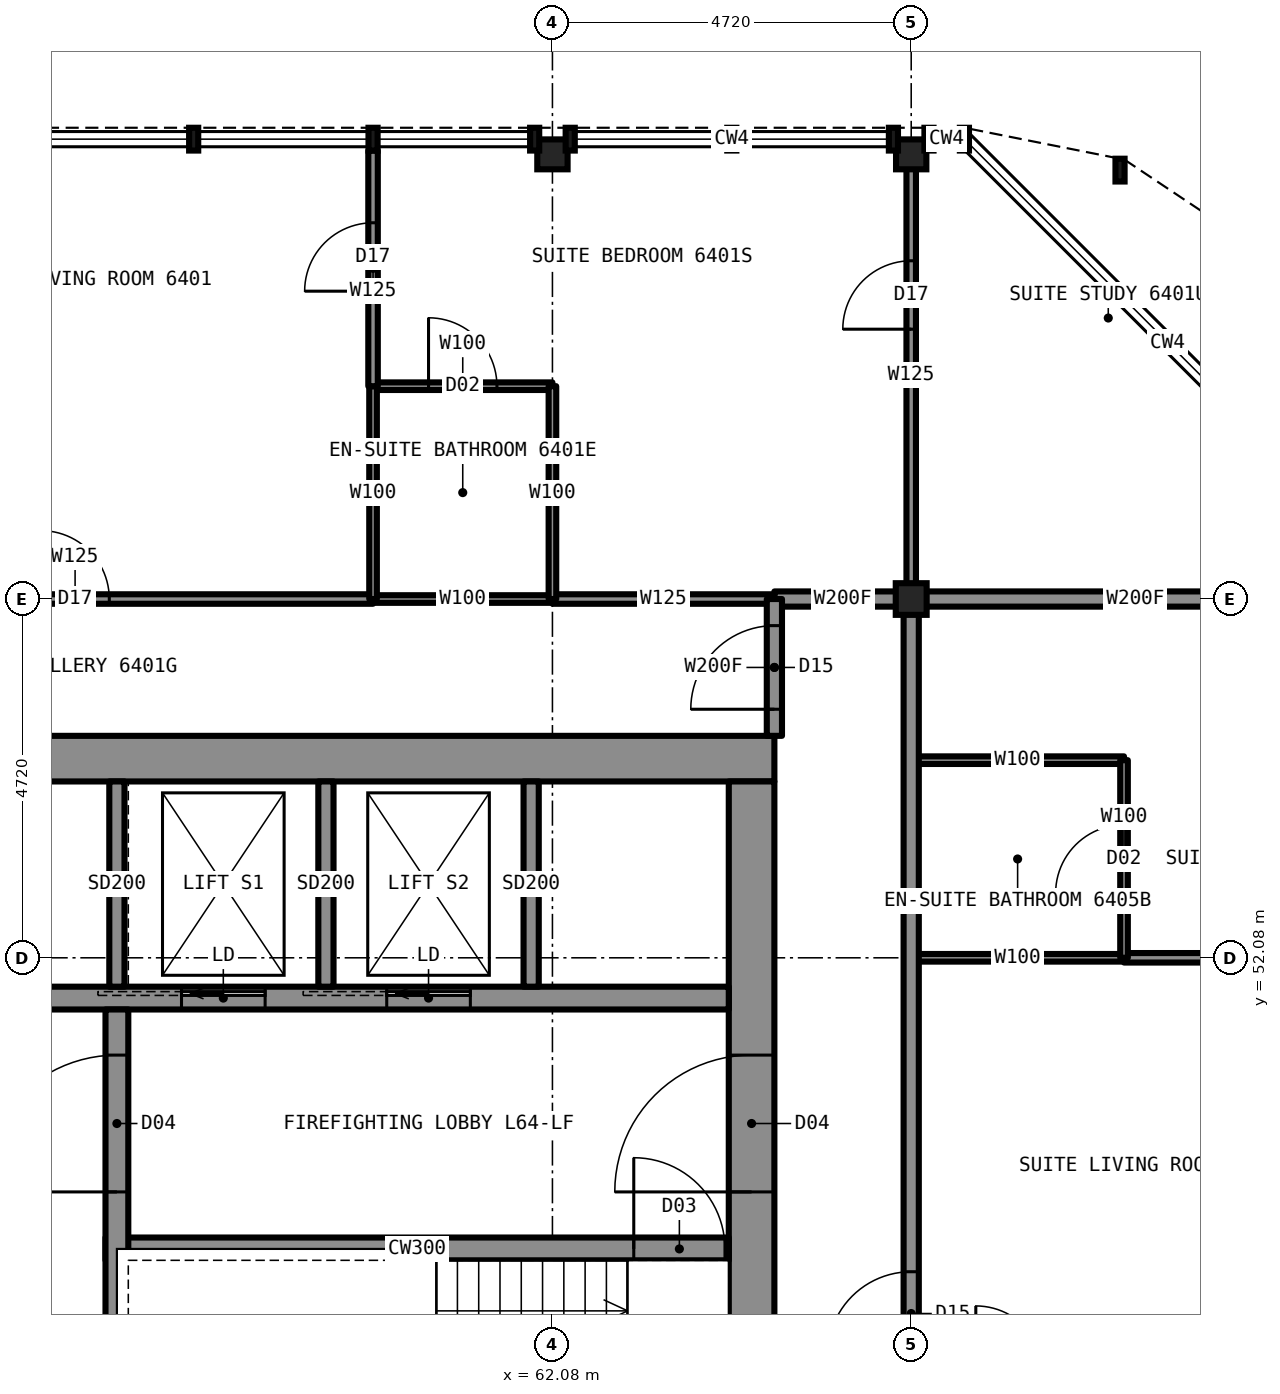
"""IFC4 building model, lengths in metres.
Left out: names, types, materials, properties, quantities, classifications, styles, units other than length and angle.
Written with IfcOpenShell. Run it as: python <this file> out.ifc"""

import sys

from ifc_helpers import new_model, si_unit, direction, frame, frame_2d, origin, origin_2d, place, context, subcontext, project, spatial, rectangle, i_section, extrude, element, fill, save


model = new_model("IFC4")
c1 = context("Model", 3, precision=1e-05, world=origin(), true_north=direction((0.0, 1.0)))
c2 = subcontext(c1, "Body", "Model", "MODEL_VIEW")
j1 = project(units=[si_unit("LENGTHUNIT", "METRE"), si_unit("PLANEANGLEUNIT", "RADIAN")], contexts=[c1])
p1 = place(None, origin())
s1 = spatial("IfcSite", under=j1, at=p1, CompositionType="ELEMENT")
p2 = place(p1, origin())
s2 = spatial("IfcBuilding", under=s1, at=p2, CompositionType="ELEMENT")
p3 = place(p2, frame((0.0, 0.0, 237.2)))
s3 = spatial("IfcBuildingStorey", under=s2, at=p3, CompositionType="ELEMENT", Elevation=237.2)
for number, where, z_axis, x_axis in (
    (1, (62.08, 62.65, 0.0), (0.0, 0.0, 1.0), (1.0, 0.0, 0.0)),
    (2, (66.8, 62.65, 0.0), (0.0, 0.0, 1.0), (1.0, 0.0, 0.0)),
):
    element("IfcColumn", number, at=place(p3, frame(where, z_axis=z_axis, x_axis=x_axis)), inside=s3, PredefinedType="COLUMN", context=c2, shape_type="SweptSolid", body=[
        extrude(i_section(OverallWidth=0.399, OverallDepth=0.394, WebThickness=0.023, FlangeThickness=0.037, at=origin_2d()), origin(), (0.0, 0.0, 1.0), 3.5),
    ])
p4 = place(p3, frame((66.8, 56.8, 0.0), z_axis=(0.0, 0.0, 1.0), x_axis=(1.0, 0.0, 0.0)))
e3 = element("IfcColumn", 3, at=p4, inside=s3, PredefinedType="COLUMN", context=c2, shape_type="SweptSolid", body=[
    extrude(i_section(OverallWidth=0.406, OverallDepth=0.417, WebThickness=0.03, FlangeThickness=0.048, at=origin_2d()), origin(), (0.0, 0.0, 1.0), 3.5),
])
p5 = place(p3, frame((45.0, 54.7, 0.0), z_axis=(0.0, 0.0, 1.0), x_axis=(1.0, 0.0, 0.0)))
e4 = element("IfcWall", 4, at=p5, inside=s3, PredefinedType="SHEAR", context=c2, shape_type="SweptSolid", body=[
    extrude(rectangle(XDim=20.0, YDim=0.6, at=frame_2d((10.0, 0.0))), origin(), (0.0, 0.0, 1.0), 3.5),
])
p6 = place(p3, frame((64.7, 35.6, 0.0), z_axis=(0.0, 0.0, 1.0), x_axis=(0.0, 1.0, 0.0)))
e5 = element("IfcWall", 5, at=p6, inside=s3, PredefinedType="SHEAR", context=c2, shape_type="SweptSolid", body=[
    extrude(rectangle(XDim=18.8, YDim=0.6, at=frame_2d((9.4, 0.0))), origin(), (0.0, 0.0, 1.0), 3.5),
])
p7 = place(p6, frame((13.4, 0.0, 0.0)))
e6 = element("IfcOpeningElement", 6, at=p7, cuts=e5, PredefinedType="OPENING", context=c2, shape_type="SweptSolid", body=[
    extrude(rectangle(XDim=1.8, YDim=2.2, at=frame_2d((0.9, 1.1))), frame((0.0, 0.31, 0.0), z_axis=(0.0, -1.0, 0.0), x_axis=(1.0, 0.0, 0.0)), (0.0, 0.0, 1.0), 0.62),
])
p8 = place(p6, frame((3.6, 0.0, 0.0)))
e7 = element("IfcOpeningElement", 7, at=p8, cuts=e5, PredefinedType="OPENING", context=c2, shape_type="SweptSolid", body=[
    extrude(rectangle(XDim=1.8, YDim=2.2, at=frame_2d((0.9, 1.1))), frame((0.0, 0.31, 0.0), z_axis=(0.0, -1.0, 0.0), x_axis=(1.0, 0.0, 0.0)), (0.0, 0.0, 1.0), 0.62),
])
p9 = place(p3, frame((45.6, 51.55, 0.0), z_axis=(0.0, 0.0, 1.0), x_axis=(1.0, 0.0, 0.0)))
e8 = element("IfcWall", 8, at=p9, inside=s3, PredefinedType="SHEAR", context=c2, shape_type="SweptSolid", body=[
    extrude(rectangle(XDim=18.8, YDim=0.3, at=frame_2d((9.4, 0.0))), origin(), (0.0, 0.0, 1.0), 3.5),
])
p10 = place(p9, frame((4.8, 0.0, 0.0)))
e9 = element("IfcOpeningElement", 9, at=p10, cuts=e8, PredefinedType="OPENING", context=c2, shape_type="SweptSolid", body=[
    extrude(rectangle(XDim=1.0, YDim=2.1, at=frame_2d((0.5, 1.05))), frame((0.0, 0.16, 0.0), z_axis=(0.0, -1.0, 0.0), x_axis=(1.0, 0.0, 0.0)), (0.0, 0.0, 1.0), 0.32),
])
p11 = place(p9, frame((11.6, 0.0, 0.0)))
e10 = element("IfcOpeningElement", 10, at=p11, cuts=e8, PredefinedType="OPENING", context=c2, shape_type="SweptSolid", body=[
    extrude(rectangle(XDim=1.1, YDim=2.2, at=frame_2d((0.55, 1.1))), frame((0.0, 0.16, 0.0), z_axis=(0.0, -1.0, 0.0), x_axis=(1.0, 0.0, 0.0)), (0.0, 0.0, 1.0), 0.32),
])
p12 = place(p9, frame((14.3, 0.0, 0.0)))
e11 = element("IfcOpeningElement", 11, at=p12, cuts=e8, PredefinedType="OPENING", context=c2, shape_type="SweptSolid", body=[
    extrude(rectangle(XDim=1.1, YDim=2.2, at=frame_2d((0.55, 1.1))), frame((0.0, 0.16, 0.0), z_axis=(0.0, -1.0, 0.0), x_axis=(1.0, 0.0, 0.0)), (0.0, 0.0, 1.0), 0.32),
])
p13 = place(p3, frame((56.2, 48.25, 0.0), z_axis=(0.0, 0.0, 1.0), x_axis=(1.0, 0.0, 0.0)))
e12 = element("IfcWall", 12, at=p13, inside=s3, PredefinedType="SHEAR", context=c2, shape_type="SweptSolid", body=[
    extrude(rectangle(XDim=8.2, YDim=0.3, at=frame_2d((4.1, 0.0))), origin(), (0.0, 0.0, 1.0), 3.5),
])
p14 = place(p13, frame((6.95, 0.0, 0.0)))
e13 = element("IfcOpeningElement", 13, at=p14, cuts=e12, PredefinedType="OPENING", context=c2, shape_type="SweptSolid", body=[
    extrude(rectangle(XDim=1.2, YDim=2.2, at=frame_2d((0.6, 1.1))), frame((0.0, 0.16, 0.0), z_axis=(0.0, -1.0, 0.0), x_axis=(1.0, 0.0, 0.0)), (0.0, 0.0, 1.0), 0.32),
])
p15 = place(p3, frame((56.35, 41.9, 0.0), z_axis=(0.0, 0.0, 1.0), x_axis=(0.0, 1.0, 0.0)))
e14 = element("IfcWall", 14, at=p15, inside=s3, PredefinedType="SHEAR", context=c2, shape_type="SweptSolid", body=[
    extrude(rectangle(XDim=9.5, YDim=0.3, at=frame_2d((4.75, 0.0))), origin(), (0.0, 0.0, 1.0), 3.5),
])
p16 = place(p15, frame((7.1, 0.0, 0.0)))
e15 = element("IfcOpeningElement", 15, at=p16, cuts=e14, PredefinedType="OPENING", context=c2, shape_type="SweptSolid", body=[
    extrude(rectangle(XDim=1.8, YDim=2.2, at=frame_2d((0.9, 1.1))), frame((0.0, 0.16, 0.0), z_axis=(0.0, -1.0, 0.0), x_axis=(1.0, 0.0, 0.0)), (0.0, 0.0, 1.0), 0.32),
])
p17 = place(p3, frame((59.72, 56.8, 0.0), z_axis=(0.0, 0.0, 1.0), x_axis=(1.0, 0.0, 0.0)))
e16 = element("IfcWall", 16, at=p17, inside=s3, PredefinedType="PARTITIONING", context=c2, shape_type="SweptSolid", body=[
    extrude(rectangle(XDim=2.36, YDim=0.1, at=frame_2d((1.18, 0.0))), origin(), (0.0, 0.0, 1.0), 3.33),
])
p18 = place(p3, frame((65.0, 56.8, 0.0), z_axis=(0.0, 0.0, 1.0), x_axis=(1.0, 0.0, 0.0)))
e17 = element("IfcWall", 17, at=p18, inside=s3, PredefinedType="PARTITIONING", context=c2, shape_type="SweptSolid", body=[
    extrude(rectangle(XDim=1.8, YDim=0.2, at=frame_2d((0.9, 0.0))), origin(), (0.0, 0.0, 1.0), 3.33),
])
p19 = place(p3, frame((66.8, 56.8, 0.0), z_axis=(0.0, 0.0, 1.0), x_axis=(1.0, 0.0, 0.0)))
e18 = element("IfcWall", 18, at=p19, inside=s3, PredefinedType="PARTITIONING", context=c2, shape_type="SweptSolid", body=[
    extrude(rectangle(XDim=5.9, YDim=0.2, at=frame_2d((2.95, 0.0))), origin(), (0.0, 0.0, 1.0), 2.573),
])
p20 = place(p3, frame((51.88, 56.8, 0.0), z_axis=(0.0, 0.0, 1.0), x_axis=(1.0, 0.0, 0.0)))
e19 = element("IfcWall", 19, at=p20, inside=s3, PredefinedType="PARTITIONING", context=c2, shape_type="SweptSolid", body=[
    extrude(rectangle(XDim=7.84, YDim=0.125, at=frame_2d((3.92, 0.0))), origin(), (0.0, 0.0, 1.0), 3.33),
])
p21 = place(p20, frame((3.47, 0.0, 0.0)))
e20 = element("IfcOpeningElement", 20, at=p21, cuts=e19, PredefinedType="OPENING", context=c2, shape_type="SweptSolid", body=[
    extrude(rectangle(XDim=0.9, YDim=2.2, at=frame_2d((0.45, 1.1))), frame((0.0, 0.073, 0.0), z_axis=(0.0, -1.0, 0.0), x_axis=(1.0, 0.0, 0.0)), (0.0, 0.0, 1.0), 0.145),
])
p22 = place(p3, frame((62.08, 56.8, 0.0), z_axis=(0.0, 0.0, 1.0), x_axis=(1.0, 0.0, 0.0)))
e21 = element("IfcWall", 21, at=p22, inside=s3, PredefinedType="PARTITIONING", context=c2, shape_type="SweptSolid", body=[
    extrude(rectangle(XDim=2.92, YDim=0.125, at=frame_2d((1.46, 0.0))), origin(), (0.0, 0.0, 1.0), 3.33),
])
p23 = place(p3, frame((59.72, 59.6, 0.0), z_axis=(0.0, 0.0, 1.0), x_axis=(1.0, 0.0, 0.0)))
e22 = element("IfcWall", 22, at=p23, inside=s3, PredefinedType="PARTITIONING", context=c2, shape_type="SweptSolid", body=[
    extrude(rectangle(XDim=2.36, YDim=0.1, at=frame_2d((1.18, 0.0))), origin(), (0.0, 0.0, 1.0), 3.33),
])
p24 = place(p23, frame((0.73, 0.0, 0.0)))
e23 = element("IfcOpeningElement", 23, at=p24, cuts=e22, PredefinedType="OPENING", context=c2, shape_type="SweptSolid", body=[
    extrude(rectangle(XDim=0.9, YDim=2.1, at=frame_2d((0.45, 1.05))), frame((0.0, 0.06, 0.0), z_axis=(0.0, -1.0, 0.0), x_axis=(1.0, 0.0, 0.0)), (0.0, 0.0, 1.0), 0.12),
])
p25 = place(p3, frame((66.8, 52.08, 0.0), z_axis=(0.0, 0.0, 1.0), x_axis=(1.0, 0.0, 0.0)))
e24 = element("IfcWall", 24, at=p25, inside=s3, PredefinedType="PARTITIONING", context=c2, shape_type="SweptSolid", body=[
    extrude(rectangle(XDim=2.8, YDim=0.1, at=frame_2d((1.4, 0.0))), origin(), (0.0, 0.0, 1.0), 2.573),
])
p26 = place(p3, frame((69.6, 52.08, 0.0), z_axis=(0.0, 0.0, 1.0), x_axis=(1.0, 0.0, 0.0)))
e25 = element("IfcWall", 25, at=p26, inside=s3, PredefinedType="PARTITIONING", context=c2, shape_type="SweptSolid", body=[
    extrude(rectangle(XDim=3.1, YDim=0.125, at=frame_2d((1.55, 0.0))), origin(), (0.0, 0.0, 1.0), 2.573),
])
p27 = place(p26, frame((1.25, 0.0, 0.0)))
e26 = element("IfcOpeningElement", 26, at=p27, cuts=e25, PredefinedType="OPENING", context=c2, shape_type="SweptSolid", body=[
    extrude(rectangle(XDim=0.9, YDim=2.2, at=frame_2d((0.45, 1.1))), frame((0.0, 0.073, 0.0), z_axis=(0.0, -1.0, 0.0), x_axis=(1.0, 0.0, 0.0)), (0.0, 0.0, 1.0), 0.145),
])
p28 = place(p3, frame((66.8, 54.68, 0.0), z_axis=(0.0, 0.0, 1.0), x_axis=(1.0, 0.0, 0.0)))
e27 = element("IfcWall", 27, at=p28, inside=s3, PredefinedType="PARTITIONING", context=c2, shape_type="SweptSolid", body=[
    extrude(rectangle(XDim=2.8, YDim=0.1, at=frame_2d((1.4, 0.0))), origin(), (0.0, 0.0, 1.0), 3.33),
])
p29 = place(p3, frame((65.0, 55.0, 0.0), z_axis=(0.0, 0.0, 1.0), x_axis=(0.0, 1.0, 0.0)))
e28 = element("IfcWall", 28, at=p29, inside=s3, PredefinedType="PARTITIONING", context=c2, shape_type="SweptSolid", body=[
    extrude(rectangle(XDim=1.8, YDim=0.2, at=frame_2d((0.9, 0.0))), origin(), (0.0, 0.0, 1.0), 3.33),
])
p30 = place(p29, frame((0.35, 0.0, 0.0)))
e29 = element("IfcOpeningElement", 29, at=p30, cuts=e28, PredefinedType="OPENING", context=c2, shape_type="SweptSolid", body=[
    extrude(rectangle(XDim=1.1, YDim=2.2, at=frame_2d((0.55, 1.1))), frame((0.0, 0.11, 0.0), z_axis=(0.0, -1.0, 0.0), x_axis=(1.0, 0.0, 0.0)), (0.0, 0.0, 1.0), 0.22),
])
p31 = place(p3, frame((66.8, 33.2, 0.0), z_axis=(0.0, 0.0, 1.0), x_axis=(0.0, 1.0, 0.0)))
e30 = element("IfcWall", 30, at=p31, inside=s3, PredefinedType="PARTITIONING", context=c2, shape_type="SweptSolid", body=[
    extrude(rectangle(XDim=23.6, YDim=0.2, at=frame_2d((11.8, 0.0))), origin(), (0.0, 0.0, 1.0), 3.33),
])
p32 = place(p31, frame((8.85, 0.0, 0.0)))
e31 = element("IfcOpeningElement", 31, at=p32, cuts=e30, PredefinedType="OPENING", context=c2, shape_type="SweptSolid", body=[
    extrude(rectangle(XDim=1.1, YDim=2.2, at=frame_2d((0.55, 1.1))), frame((0.0, 0.11, 0.0), z_axis=(0.0, -1.0, 0.0), x_axis=(1.0, 0.0, 0.0)), (0.0, 0.0, 1.0), 0.22),
])
p33 = place(p31, frame((13.65, 0.0, 0.0)))
e32 = element("IfcOpeningElement", 32, at=p33, cuts=e30, PredefinedType="OPENING", context=c2, shape_type="SweptSolid", body=[
    extrude(rectangle(XDim=1.1, YDim=2.2, at=frame_2d((0.55, 1.1))), frame((0.0, 0.11, 0.0), z_axis=(0.0, -1.0, 0.0), x_axis=(1.0, 0.0, 0.0)), (0.0, 0.0, 1.0), 0.22),
])
p34 = place(p3, frame((66.8, 56.8, 0.0), z_axis=(0.0, 0.0, 1.0), x_axis=(0.0, 1.0, 0.0)))
e33 = element("IfcWall", 33, at=p34, inside=s3, PredefinedType="PARTITIONING", context=c2, shape_type="SweptSolid", body=[
    extrude(rectangle(XDim=5.9, YDim=0.125, at=frame_2d((2.95, 0.0))), origin(), (0.0, 0.0, 1.0), 2.573),
])
p35 = place(p34, frame((3.55, 0.0, 0.0)))
e34 = element("IfcOpeningElement", 34, at=p35, cuts=e33, PredefinedType="OPENING", context=c2, shape_type="SweptSolid", body=[
    extrude(rectangle(XDim=0.9, YDim=2.2, at=frame_2d((0.45, 1.1))), frame((0.0, 0.073, 0.0), z_axis=(0.0, -1.0, 0.0), x_axis=(1.0, 0.0, 0.0)), (0.0, 0.0, 1.0), 0.145),
])
p36 = place(p3, frame((69.6, 52.08, 0.0), z_axis=(0.0, 0.0, 1.0), x_axis=(0.0, 1.0, 0.0)))
e35 = element("IfcWall", 35, at=p36, inside=s3, PredefinedType="PARTITIONING", context=c2, shape_type="SweptSolid", body=[
    extrude(rectangle(XDim=2.6, YDim=0.1, at=frame_2d((1.3, 0.0))), origin(), (0.0, 0.0, 1.0), 3.33),
])
p37 = place(p36, frame((0.85, 0.0, 0.0)))
e36 = element("IfcOpeningElement", 36, at=p37, cuts=e35, PredefinedType="OPENING", context=c2, shape_type="SweptSolid", body=[
    extrude(rectangle(XDim=0.9, YDim=2.1, at=frame_2d((0.45, 1.05))), frame((0.0, 0.06, 0.0), z_axis=(0.0, -1.0, 0.0), x_axis=(1.0, 0.0, 0.0)), (0.0, 0.0, 1.0), 0.12),
])
p38 = place(p3, frame((59.72, 56.8, 0.0), z_axis=(0.0, 0.0, 1.0), x_axis=(0.0, 1.0, 0.0)))
e37 = element("IfcWall", 37, at=p38, inside=s3, PredefinedType="PARTITIONING", context=c2, shape_type="SweptSolid", body=[
    extrude(rectangle(XDim=2.8, YDim=0.1, at=frame_2d((1.4, 0.0))), origin(), (0.0, 0.0, 1.0), 3.33),
])
p39 = place(p3, frame((59.72, 59.6, 0.0), z_axis=(0.0, 0.0, 1.0), x_axis=(0.0, 1.0, 0.0)))
e38 = element("IfcWall", 38, at=p39, inside=s3, PredefinedType="PARTITIONING", context=c2, shape_type="SweptSolid", body=[
    extrude(rectangle(XDim=3.1, YDim=0.125, at=frame_2d((1.55, 0.0))), origin(), (0.0, 0.0, 1.0), 3.33),
])
p40 = place(p39, frame((1.25, 0.0, 0.0)))
e39 = element("IfcOpeningElement", 39, at=p40, cuts=e38, PredefinedType="OPENING", context=c2, shape_type="SweptSolid", body=[
    extrude(rectangle(XDim=0.9, YDim=2.2, at=frame_2d((0.45, 1.1))), frame((0.0, 0.073, 0.0), z_axis=(0.0, -1.0, 0.0), x_axis=(1.0, 0.0, 0.0)), (0.0, 0.0, 1.0), 0.145),
])
p41 = place(p3, frame((62.08, 56.8, 0.0), z_axis=(0.0, 0.0, 1.0), x_axis=(0.0, 1.0, 0.0)))
e40 = element("IfcWall", 40, at=p41, inside=s3, PredefinedType="PARTITIONING", context=c2, shape_type="SweptSolid", body=[
    extrude(rectangle(XDim=2.8, YDim=0.1, at=frame_2d((1.4, 0.0))), origin(), (0.0, 0.0, 1.0), 2.573),
])
for number, where, z_axis, x_axis in (
    (41, (59.1, 51.7, 0.0), (0.0, 0.0, 1.0), (0.0, 1.0, 0.0)),
    (42, (61.8, 51.7, 0.0), (0.0, 0.0, 1.0), (0.0, 1.0, 0.0)),
    (43, (56.35, 51.7, 0.0), (0.0, 0.0, 1.0), (0.0, 1.0, 0.0)),
):
    element("IfcWall", number, at=place(p3, frame(where, z_axis=z_axis, x_axis=x_axis)), inside=s3, PredefinedType="PARTITIONING", context=c2, shape_type="SweptSolid", body=[
        extrude(rectangle(XDim=2.7, YDim=0.2, at=frame_2d((1.35, 0.0))), origin(), (0.0, 0.0, 1.0), 3.33),
    ])
p42 = place(p21, origin())
e44 = element("IfcDoor", 44, at=p42, inside=s3, OperationType="SINGLE_SWING_LEFT", PredefinedType="DOOR", context=c2, shape_type="SweptSolid", body=[
    extrude(rectangle(XDim=0.9, YDim=2.2, at=frame_2d((0.45, 1.1))), frame((0.0, 0.025, 0.0), z_axis=(0.0, -1.0, 0.0), x_axis=(1.0, 0.0, 0.0)), (0.0, 0.0, 1.0), 0.05),
])
fill(e20, e44)
p43 = place(p24, origin())
e45 = element("IfcDoor", 45, at=p43, inside=s3, OperationType="SINGLE_SWING_RIGHT", PredefinedType="DOOR", context=c2, shape_type="SweptSolid", body=[
    extrude(rectangle(XDim=0.9, YDim=2.1, at=frame_2d((0.45, 1.05))), frame((0.0, 0.025, 0.0), z_axis=(0.0, -1.0, 0.0), x_axis=(1.0, 0.0, 0.0)), (0.0, 0.0, 1.0), 0.05),
])
fill(e23, e45)
p44 = place(p30, origin())
e46 = element("IfcDoor", 46, at=p44, inside=s3, OperationType="SINGLE_SWING_LEFT", PredefinedType="DOOR", context=c2, shape_type="SweptSolid", body=[
    extrude(rectangle(XDim=1.1, YDim=2.2, at=frame_2d((0.55, 1.1))), frame((0.0, 0.025, 0.0), z_axis=(0.0, -1.0, 0.0), x_axis=(1.0, 0.0, 0.0)), (0.0, 0.0, 1.0), 0.05),
])
fill(e29, e46)
p45 = place(p40, origin())
e47 = element("IfcDoor", 47, at=p45, inside=s3, OperationType="SINGLE_SWING_LEFT", PredefinedType="DOOR", context=c2, shape_type="SweptSolid", body=[
    extrude(rectangle(XDim=0.9, YDim=2.2, at=frame_2d((0.45, 1.1))), frame((0.0, 0.025, 0.0), z_axis=(0.0, -1.0, 0.0), x_axis=(1.0, 0.0, 0.0)), (0.0, 0.0, 1.0), 0.05),
])
fill(e39, e47)
p46 = place(p35, origin())
e48 = element("IfcDoor", 48, at=p46, inside=s3, OperationType="SINGLE_SWING_LEFT", PredefinedType="DOOR", context=c2, shape_type="SweptSolid", body=[
    extrude(rectangle(XDim=0.9, YDim=2.2, at=frame_2d((0.45, 1.1))), frame((0.0, 0.025, 0.0), z_axis=(0.0, -1.0, 0.0), x_axis=(1.0, 0.0, 0.0)), (0.0, 0.0, 1.0), 0.05),
])
fill(e34, e48)
p47 = place(p33, origin())
e49 = element("IfcDoor", 49, at=p47, inside=s3, OperationType="SINGLE_SWING_LEFT", PredefinedType="DOOR", context=c2, shape_type="SweptSolid", body=[
    extrude(rectangle(XDim=1.1, YDim=2.2, at=frame_2d((0.55, 1.1))), frame((0.0, 0.025, 0.0), z_axis=(0.0, -1.0, 0.0), x_axis=(1.0, 0.0, 0.0)), (0.0, 0.0, 1.0), 0.05),
])
fill(e32, e49)
p48 = place(p37, origin())
e50 = element("IfcDoor", 50, at=p48, inside=s3, OperationType="SINGLE_SWING_RIGHT", PredefinedType="DOOR", context=c2, shape_type="SweptSolid", body=[
    extrude(rectangle(XDim=0.9, YDim=2.1, at=frame_2d((0.45, 1.05))), frame((0.0, 0.025, 0.0), z_axis=(0.0, -1.0, 0.0), x_axis=(1.0, 0.0, 0.0)), (0.0, 0.0, 1.0), 0.05),
])
fill(e36, e50)
p49 = place(p7, origin())
e51 = element("IfcDoor", 51, at=p49, inside=s3, OperationType="DOUBLE_DOOR_SINGLE_SWING", PredefinedType="DOOR", context=c2, shape_type="SweptSolid", body=[
    extrude(rectangle(XDim=1.8, YDim=2.2, at=frame_2d((0.9, 1.1))), frame((0.0, 0.025, 0.0), z_axis=(0.0, -1.0, 0.0), x_axis=(1.0, 0.0, 0.0)), (0.0, 0.0, 1.0), 0.05),
])
fill(e6, e51)
p50 = place(p16, origin())
e52 = element("IfcDoor", 52, at=p50, inside=s3, OperationType="DOUBLE_DOOR_SINGLE_SWING", PredefinedType="DOOR", context=c2, shape_type="SweptSolid", body=[
    extrude(rectangle(XDim=1.8, YDim=2.2, at=frame_2d((0.9, 1.1))), frame((0.0, 0.025, 0.0), z_axis=(0.0, -1.0, 0.0), x_axis=(1.0, 0.0, 0.0)), (0.0, 0.0, 1.0), 0.05),
])
fill(e15, e52)
p51 = place(p14, origin())
e53 = element("IfcDoor", 53, at=p51, inside=s3, OperationType="SINGLE_SWING_LEFT", PredefinedType="DOOR", context=c2, shape_type="SweptSolid", body=[
    extrude(rectangle(XDim=1.2, YDim=2.2, at=frame_2d((0.6, 1.1))), frame((0.0, 0.025, 0.0), z_axis=(0.0, -1.0, 0.0), x_axis=(1.0, 0.0, 0.0)), (0.0, 0.0, 1.0), 0.05),
])
fill(e13, e53)
p52 = place(p11, origin())
e54 = element("IfcDoor", 54, at=p52, inside=s3, OperationType="SLIDING_TO_LEFT", PredefinedType="DOOR", context=c2, shape_type="SweptSolid", body=[
    extrude(rectangle(XDim=1.1, YDim=2.2, at=frame_2d((0.55, 1.1))), frame((0.0, 0.025, 0.0), z_axis=(0.0, -1.0, 0.0), x_axis=(1.0, 0.0, 0.0)), (0.0, 0.0, 1.0), 0.05),
])
fill(e10, e54)
p53 = place(p12, origin())
e55 = element("IfcDoor", 55, at=p53, inside=s3, OperationType="SLIDING_TO_LEFT", PredefinedType="DOOR", context=c2, shape_type="SweptSolid", body=[
    extrude(rectangle(XDim=1.1, YDim=2.2, at=frame_2d((0.55, 1.1))), frame((0.0, 0.025, 0.0), z_axis=(0.0, -1.0, 0.0), x_axis=(1.0, 0.0, 0.0)), (0.0, 0.0, 1.0), 0.05),
])
fill(e11, e55)
save(model, sys.argv[1])
